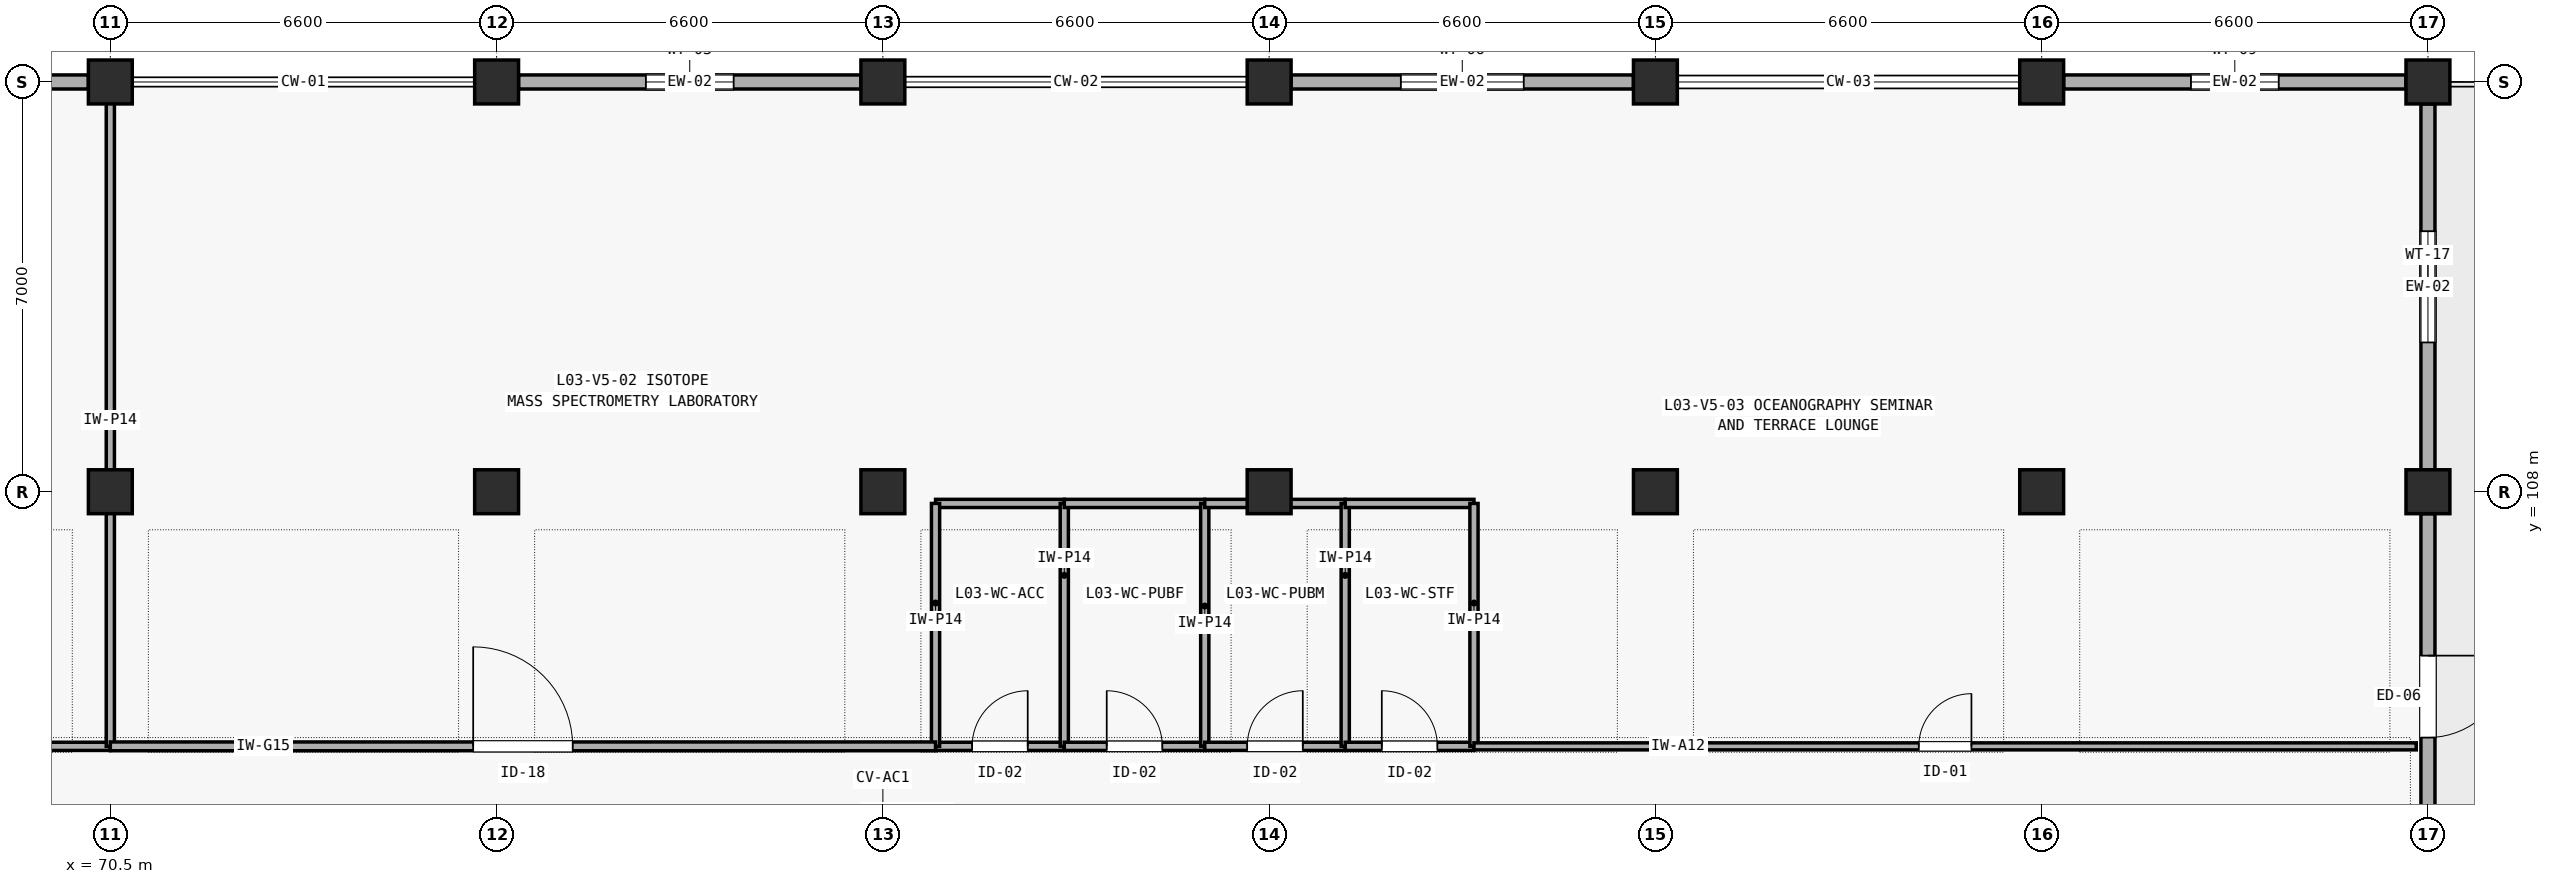
"""IFC4 building model, lengths in metres.
Left out: names, types, materials, properties, quantities, classifications, styles, units other than length and angle.
Written with IfcOpenShell. Run it as: python <this file> out.ifc"""

import sys

from ifc_helpers import new_model, si_unit, direction, frame, frame_2d, origin, origin_2d, place, context, subcontext, project, spatial, rectangle, extrude, element, fill, save


model = new_model("IFC4")
c1 = context("Model", 3, precision=1e-05, world=origin(), true_north=direction((0.0, 1.0)))
c2 = subcontext(c1, "Body", "Model", "MODEL_VIEW")
j1 = project(units=[si_unit("LENGTHUNIT", "METRE"), si_unit("PLANEANGLEUNIT", "RADIAN")], contexts=[c1])
p1 = place(None, origin())
s1 = spatial("IfcSite", under=j1, at=p1, CompositionType="ELEMENT")
p2 = place(p1, origin())
s2 = spatial("IfcBuilding", under=s1, at=p2, CompositionType="ELEMENT")
p3 = place(p2, frame((0.0, 0.0, 12.6)))
s3 = spatial("IfcBuildingStorey", under=s2, at=p3, CompositionType="ELEMENT", Elevation=12.6)
for number, where, z_axis, x_axis in (
    (1, (70.5, 108.0, 0.0), (0.0, 0.0, 1.0), (1.0, 0.0, 0.0)),
    (2, (70.5, 115.0, 0.0), (0.0, 0.0, 1.0), (1.0, 0.0, 0.0)),
    (3, (77.1, 108.0, 0.0), (0.0, 0.0, 1.0), (1.0, 0.0, 0.0)),
    (4, (77.1, 115.0, 0.0), (0.0, 0.0, 1.0), (1.0, 0.0, 0.0)),
    (5, (83.7, 108.0, 0.0), (0.0, 0.0, 1.0), (1.0, 0.0, 0.0)),
    (6, (83.7, 115.0, 0.0), (0.0, 0.0, 1.0), (1.0, 0.0, 0.0)),
    (7, (90.3, 108.0, 0.0), (0.0, 0.0, 1.0), (1.0, 0.0, 0.0)),
    (8, (90.3, 115.0, 0.0), (0.0, 0.0, 1.0), (1.0, 0.0, 0.0)),
    (9, (96.9, 108.0, 0.0), (0.0, 0.0, 1.0), (1.0, 0.0, 0.0)),
    (10, (96.9, 115.0, 0.0), (0.0, 0.0, 1.0), (1.0, 0.0, 0.0)),
    (11, (103.5, 108.0, 0.0), (0.0, 0.0, 1.0), (1.0, 0.0, 0.0)),
    (12, (103.5, 115.0, 0.0), (0.0, 0.0, 1.0), (1.0, 0.0, 0.0)),
    (13, (110.1, 108.0, 0.0), (0.0, 0.0, 1.0), (1.0, 0.0, 0.0)),
    (14, (110.1, 115.0, 0.0), (0.0, 0.0, 1.0), (1.0, 0.0, 0.0)),
):
    element("IfcColumn", number, at=place(p3, frame(where, z_axis=z_axis, x_axis=x_axis)), inside=s3, PredefinedType="COLUMN", context=c2, shape_type="SweptSolid", body=[
        extrude(rectangle(XDim=0.75, YDim=0.75, at=origin_2d()), origin(), (0.0, 0.0, 1.0), 4.2),
    ])
p4 = place(p3, frame((64.275, 115.0, 0.0), z_axis=(0.0, 0.0, 1.0), x_axis=(1.0, 0.0, 0.0)))
e15 = element("IfcWall", 15, at=p4, inside=s3, PredefinedType="SOLIDWALL", context=c2, shape_type="SweptSolid", body=[
    extrude(rectangle(XDim=5.85, YDim=0.24, at=frame_2d((2.925, 0.0))), origin(), (0.0, 0.0, 1.0), 3.285),
])
p5 = place(p4, frame((1.9, 0.0, 0.85)))
e16 = element("IfcOpeningElement", 16, at=p5, cuts=e15, PredefinedType="OPENING", context=c2, shape_type="SweptSolid", body=[
    extrude(rectangle(XDim=2.05, YDim=1.55, at=frame_2d((1.025, 0.775))), frame((0.0, 0.13, 0.0), z_axis=(0.0, -1.0, 0.0), x_axis=(1.0, 0.0, 0.0)), (0.0, 0.0, 1.0), 0.26),
])
p6 = place(p3, frame((77.475, 115.0, 0.0), z_axis=(0.0, 0.0, 1.0), x_axis=(1.0, 0.0, 0.0)))
e17 = element("IfcWall", 17, at=p6, inside=s3, PredefinedType="SOLIDWALL", context=c2, shape_type="SweptSolid", body=[
    extrude(rectangle(XDim=5.85, YDim=0.24, at=frame_2d((2.925, 0.0))), origin(), (0.0, 0.0, 1.0), 3.365),
])
p7 = place(p6, frame((2.175, 0.0, 0.85)))
e18 = element("IfcOpeningElement", 18, at=p7, cuts=e17, PredefinedType="OPENING", context=c2, shape_type="SweptSolid", body=[
    extrude(rectangle(XDim=1.5, YDim=1.35, at=frame_2d((0.75, 0.675))), frame((0.0, 0.13, 0.0), z_axis=(0.0, -1.0, 0.0), x_axis=(1.0, 0.0, 0.0)), (0.0, 0.0, 1.0), 0.26),
])
p8 = place(p3, frame((90.675, 115.0, 0.0), z_axis=(0.0, 0.0, 1.0), x_axis=(1.0, 0.0, 0.0)))
e19 = element("IfcWall", 19, at=p8, inside=s3, PredefinedType="SOLIDWALL", context=c2, shape_type="SweptSolid", body=[
    extrude(rectangle(XDim=5.85, YDim=0.24, at=frame_2d((2.925, 0.0))), origin(), (0.0, 0.0, 1.0), 3.385),
])
p9 = place(p8, frame((1.875, 0.0, 0.85)))
e20 = element("IfcOpeningElement", 20, at=p9, cuts=e19, PredefinedType="OPENING", context=c2, shape_type="SweptSolid", body=[
    extrude(rectangle(XDim=2.1, YDim=1.35, at=frame_2d((1.05, 0.675))), frame((0.0, 0.13, 0.0), z_axis=(0.0, -1.0, 0.0), x_axis=(1.0, 0.0, 0.0)), (0.0, 0.0, 1.0), 0.26),
])
p10 = place(p3, frame((103.875, 115.0, 0.0), z_axis=(0.0, 0.0, 1.0), x_axis=(1.0, 0.0, 0.0)))
e21 = element("IfcWall", 21, at=p10, inside=s3, PredefinedType="SOLIDWALL", context=c2, shape_type="SweptSolid", body=[
    extrude(rectangle(XDim=5.85, YDim=0.24, at=frame_2d((2.925, 0.0))), origin(), (0.0, 0.0, 1.0), 3.135),
])
p11 = place(p10, frame((2.175, 0.0, 0.85)))
e22 = element("IfcOpeningElement", 22, at=p11, cuts=e21, PredefinedType="OPENING", context=c2, shape_type="SweptSolid", body=[
    extrude(rectangle(XDim=1.5, YDim=1.5, at=frame_2d((0.75, 0.75))), frame((0.0, 0.13, 0.0), z_axis=(0.0, -1.0, 0.0), x_axis=(1.0, 0.0, 0.0)), (0.0, 0.0, 1.0), 0.26),
])
p12 = place(p3, frame((110.1, 101.375, 0.0), z_axis=(0.0, 0.0, 1.0), x_axis=(0.0, 1.0, 0.0)))
e23 = element("IfcWall", 23, at=p12, inside=s3, PredefinedType="SOLIDWALL", context=c2, shape_type="SweptSolid", body=[
    extrude(rectangle(XDim=6.25, YDim=0.24, at=frame_2d((3.125, 0.0))), origin(), (0.0, 0.0, 1.0), 3.565),
])
p13 = place(p12, frame((2.425, 0.0, 0.0)))
e24 = element("IfcOpeningElement", 24, at=p13, cuts=e23, PredefinedType="OPENING", context=c2, shape_type="SweptSolid", body=[
    extrude(rectangle(XDim=1.4, YDim=2.15, at=frame_2d((0.7, 1.075))), frame((0.0, 0.13, 0.0), z_axis=(0.0, -1.0, 0.0), x_axis=(1.0, 0.0, 0.0)), (0.0, 0.0, 1.0), 0.26),
])
p14 = place(p3, frame((110.1, 108.375, 0.0), z_axis=(0.0, 0.0, 1.0), x_axis=(0.0, 1.0, 0.0)))
e25 = element("IfcWall", 25, at=p14, inside=s3, PredefinedType="SOLIDWALL", context=c2, shape_type="SweptSolid", body=[
    extrude(rectangle(XDim=6.25, YDim=0.24, at=frame_2d((3.125, 0.0))), origin(), (0.0, 0.0, 1.0), 3.565),
])
p15 = place(p14, frame((2.175, 0.0, 0.85)))
e26 = element("IfcOpeningElement", 26, at=p15, cuts=e25, PredefinedType="OPENING", context=c2, shape_type="SweptSolid", body=[
    extrude(rectangle(XDim=1.9, YDim=1.25, at=frame_2d((0.95, 0.625))), frame((0.0, 0.13, 0.0), z_axis=(0.0, -1.0, 0.0), x_axis=(1.0, 0.0, 0.0)), (0.0, 0.0, 1.0), 0.26),
])
p16 = place(p3, frame((84.6, 103.65, 0.0), z_axis=(0.0, 0.0, 1.0), x_axis=(1.0, 0.0, 0.0)))
e27 = element("IfcWall", 27, at=p16, inside=s3, PredefinedType="PLUMBINGWALL", context=c2, shape_type="SweptSolid", body=[
    extrude(rectangle(XDim=2.2, YDim=0.14, at=frame_2d((1.1, 0.0))), origin(), (0.0, 0.0, 1.0), 3.9),
])
p17 = place(p16, frame((0.625, 0.0, 0.0)))
e28 = element("IfcOpeningElement", 28, at=p17, cuts=e27, PredefinedType="OPENING", context=c2, shape_type="SweptSolid", body=[
    extrude(rectangle(XDim=0.95, YDim=2.1, at=frame_2d((0.475, 1.05))), frame((0.0, 0.08, 0.0), z_axis=(0.0, -1.0, 0.0), x_axis=(1.0, 0.0, 0.0)), (0.0, 0.0, 1.0), 0.16),
])
p18 = place(p3, frame((84.6, 107.8, 0.0), z_axis=(0.0, 0.0, 1.0), x_axis=(1.0, 0.0, 0.0)))
e29 = element("IfcWall", 29, at=p18, inside=s3, PredefinedType="PLUMBINGWALL", context=c2, shape_type="SweptSolid", body=[
    extrude(rectangle(XDim=2.2, YDim=0.14, at=frame_2d((1.1, 0.0))), origin(), (0.0, 0.0, 1.0), 3.385),
])
for number, where, z_axis, x_axis in (
    (30, (84.6, 103.65, 0.0), (0.0, 0.0, 1.0), (0.0, 1.0, 0.0)),
    (31, (86.8, 103.65, 0.0), (0.0, 0.0, 1.0), (0.0, 1.0, 0.0)),
):
    element("IfcWall", number, at=place(p3, frame(where, z_axis=z_axis, x_axis=x_axis)), inside=s3, PredefinedType="PLUMBINGWALL", context=c2, shape_type="SweptSolid", body=[
        extrude(rectangle(XDim=4.15, YDim=0.14, at=frame_2d((2.075, 0.0))), origin(), (0.0, 0.0, 1.0), 3.9),
    ])
p19 = place(p3, frame((86.8, 103.65, 0.0), z_axis=(0.0, 0.0, 1.0), x_axis=(1.0, 0.0, 0.0)))
e32 = element("IfcWall", 32, at=p19, inside=s3, PredefinedType="PLUMBINGWALL", context=c2, shape_type="SweptSolid", body=[
    extrude(rectangle(XDim=2.4, YDim=0.14, at=frame_2d((1.2, 0.0))), origin(), (0.0, 0.0, 1.0), 3.9),
])
p20 = place(p19, frame((0.725, 0.0, 0.0)))
e33 = element("IfcOpeningElement", 33, at=p20, cuts=e32, PredefinedType="OPENING", context=c2, shape_type="SweptSolid", body=[
    extrude(rectangle(XDim=0.95, YDim=2.1, at=frame_2d((0.475, 1.05))), frame((0.0, 0.08, 0.0), z_axis=(0.0, -1.0, 0.0), x_axis=(1.0, 0.0, 0.0)), (0.0, 0.0, 1.0), 0.16),
])
p21 = place(p3, frame((86.8, 107.8, 0.0), z_axis=(0.0, 0.0, 1.0), x_axis=(1.0, 0.0, 0.0)))
e34 = element("IfcWall", 34, at=p21, inside=s3, PredefinedType="PLUMBINGWALL", context=c2, shape_type="SweptSolid", body=[
    extrude(rectangle(XDim=2.4, YDim=0.14, at=frame_2d((1.2, 0.0))), origin(), (0.0, 0.0, 1.0), 3.385),
])
p22 = place(p3, frame((89.2, 103.65, 0.0), z_axis=(0.0, 0.0, 1.0), x_axis=(0.0, 1.0, 0.0)))
e35 = element("IfcWall", 35, at=p22, inside=s3, PredefinedType="PLUMBINGWALL", context=c2, shape_type="SweptSolid", body=[
    extrude(rectangle(XDim=4.15, YDim=0.14, at=frame_2d((2.075, 0.0))), origin(), (0.0, 0.0, 1.0), 3.9),
])
p23 = place(p3, frame((89.2, 103.65, 0.0), z_axis=(0.0, 0.0, 1.0), x_axis=(1.0, 0.0, 0.0)))
e36 = element("IfcWall", 36, at=p23, inside=s3, PredefinedType="PLUMBINGWALL", context=c2, shape_type="SweptSolid", body=[
    extrude(rectangle(XDim=2.4, YDim=0.14, at=frame_2d((1.2, 0.0))), origin(), (0.0, 0.0, 1.0), 3.9),
])
p24 = place(p23, frame((0.725, 0.0, 0.0)))
e37 = element("IfcOpeningElement", 37, at=p24, cuts=e36, PredefinedType="OPENING", context=c2, shape_type="SweptSolid", body=[
    extrude(rectangle(XDim=0.95, YDim=2.1, at=frame_2d((0.475, 1.05))), frame((0.0, 0.08, 0.0), z_axis=(0.0, -1.0, 0.0), x_axis=(1.0, 0.0, 0.0)), (0.0, 0.0, 1.0), 0.16),
])
p25 = place(p3, frame((89.2, 107.8, 0.0), z_axis=(0.0, 0.0, 1.0), x_axis=(1.0, 0.0, 0.0)))
e38 = element("IfcWall", 38, at=p25, inside=s3, PredefinedType="PLUMBINGWALL", context=c2, shape_type="SweptSolid", body=[
    extrude(rectangle(XDim=2.4, YDim=0.14, at=frame_2d((1.2, 0.0))), origin(), (0.0, 0.0, 1.0), 3.385),
])
p26 = place(p3, frame((91.6, 103.65, 0.0), z_axis=(0.0, 0.0, 1.0), x_axis=(0.0, 1.0, 0.0)))
e39 = element("IfcWall", 39, at=p26, inside=s3, PredefinedType="PLUMBINGWALL", context=c2, shape_type="SweptSolid", body=[
    extrude(rectangle(XDim=4.15, YDim=0.14, at=frame_2d((2.075, 0.0))), origin(), (0.0, 0.0, 1.0), 3.9),
])
p27 = place(p3, frame((91.6, 103.65, 0.0), z_axis=(0.0, 0.0, 1.0), x_axis=(1.0, 0.0, 0.0)))
e40 = element("IfcWall", 40, at=p27, inside=s3, PredefinedType="PLUMBINGWALL", context=c2, shape_type="SweptSolid", body=[
    extrude(rectangle(XDim=2.2, YDim=0.14, at=frame_2d((1.1, 0.0))), origin(), (0.0, 0.0, 1.0), 3.9),
])
p28 = place(p27, frame((0.625, 0.0, 0.0)))
e41 = element("IfcOpeningElement", 41, at=p28, cuts=e40, PredefinedType="OPENING", context=c2, shape_type="SweptSolid", body=[
    extrude(rectangle(XDim=0.95, YDim=2.1, at=frame_2d((0.475, 1.05))), frame((0.0, 0.08, 0.0), z_axis=(0.0, -1.0, 0.0), x_axis=(1.0, 0.0, 0.0)), (0.0, 0.0, 1.0), 0.16),
])
p29 = place(p3, frame((91.6, 107.8, 0.0), z_axis=(0.0, 0.0, 1.0), x_axis=(1.0, 0.0, 0.0)))
e42 = element("IfcWall", 42, at=p29, inside=s3, PredefinedType="PLUMBINGWALL", context=c2, shape_type="SweptSolid", body=[
    extrude(rectangle(XDim=2.2, YDim=0.14, at=frame_2d((1.1, 0.0))), origin(), (0.0, 0.0, 1.0), 3.385),
])
p30 = place(p3, frame((93.8, 103.65, 0.0), z_axis=(0.0, 0.0, 1.0), x_axis=(0.0, 1.0, 0.0)))
e43 = element("IfcWall", 43, at=p30, inside=s3, PredefinedType="PLUMBINGWALL", context=c2, shape_type="SweptSolid", body=[
    extrude(rectangle(XDim=4.15, YDim=0.14, at=frame_2d((2.075, 0.0))), origin(), (0.0, 0.0, 1.0), 3.9),
])
p31 = place(p3, frame((57.5, 103.65, 0.0), z_axis=(0.0, 0.0, 1.0), x_axis=(1.0, 0.0, 0.0)))
e44 = element("IfcWall", 44, at=p31, inside=s3, PredefinedType="PLUMBINGWALL", context=c2, shape_type="SweptSolid", body=[
    extrude(rectangle(XDim=13.0, YDim=0.14, at=frame_2d((6.5, 0.0))), origin(), (0.0, 0.0, 1.0), 3.9),
])
p32 = place(p31, frame((5.75, 0.0, 0.0)))
e45 = element("IfcOpeningElement", 45, at=p32, cuts=e44, PredefinedType="OPENING", context=c2, shape_type="SweptSolid", body=[
    extrude(rectangle(XDim=1.5, YDim=2.15, at=frame_2d((0.75, 1.075))), frame((0.0, 0.08, 0.0), z_axis=(0.0, -1.0, 0.0), x_axis=(1.0, 0.0, 0.0)), (0.0, 0.0, 1.0), 0.16),
])
p33 = place(p3, frame((70.5, 103.65, 0.0), z_axis=(0.0, 0.0, 1.0), x_axis=(0.0, 1.0, 0.0)))
e46 = element("IfcWall", 46, at=p33, inside=s3, PredefinedType="PLUMBINGWALL", context=c2, shape_type="SweptSolid", body=[
    extrude(rectangle(XDim=11.15, YDim=0.14, at=frame_2d((5.575, 0.0))), origin(), (0.0, 0.0, 1.0), 3.545),
])
p34 = place(p3, frame((70.5, 103.65, 0.0), z_axis=(0.0, 0.0, 1.0), x_axis=(1.0, 0.0, 0.0)))
e47 = element("IfcWall", 47, at=p34, inside=s3, PredefinedType="PARTITIONING", context=c2, shape_type="SweptSolid", body=[
    extrude(rectangle(XDim=14.1, YDim=0.15, at=frame_2d((7.05, 0.0))), origin(), (0.0, 0.0, 1.0), 3.9),
])
p35 = place(p34, frame((6.2, 0.0, 0.0)))
e48 = element("IfcOpeningElement", 48, at=p35, cuts=e47, PredefinedType="OPENING", context=c2, shape_type="SweptSolid", body=[
    extrude(rectangle(XDim=1.7, YDim=2.2, at=frame_2d((0.85, 1.1))), frame((0.0, 0.085, 0.0), z_axis=(0.0, -1.0, 0.0), x_axis=(1.0, 0.0, 0.0)), (0.0, 0.0, 1.0), 0.17),
])
p36 = place(p3, frame((93.8, 103.65, 0.0), z_axis=(0.0, 0.0, 1.0), x_axis=(1.0, 0.0, 0.0)))
e49 = element("IfcWall", 49, at=p36, inside=s3, PredefinedType="PARTITIONING", context=c2, shape_type="SweptSolid", body=[
    extrude(rectangle(XDim=16.1, YDim=0.12, at=frame_2d((8.05, 0.0))), origin(), (0.0, 0.0, 1.0), 3.9),
])
p37 = place(p36, frame((7.6, 0.0, 0.0)))
e50 = element("IfcOpeningElement", 50, at=p37, cuts=e49, PredefinedType="OPENING", context=c2, shape_type="SweptSolid", body=[
    extrude(rectangle(XDim=0.9, YDim=2.1, at=frame_2d((0.45, 1.05))), frame((0.0, 0.07, 0.0), z_axis=(0.0, -1.0, 0.0), x_axis=(1.0, 0.0, 0.0)), (0.0, 0.0, 1.0), 0.14),
])
p38 = place(p7, origin())
e51 = element("IfcWindow", 51, at=p38, inside=s3, PartitioningType="SINGLE_PANEL", PredefinedType="WINDOW", context=c2, shape_type="SweptSolid", body=[
    extrude(rectangle(XDim=1.5, YDim=1.35, at=frame_2d((0.75, 0.675))), frame((0.0, 0.03, 0.0), z_axis=(0.0, -1.0, 0.0), x_axis=(1.0, 0.0, 0.0)), (0.0, 0.0, 1.0), 0.06),
])
fill(e18, e51)
p39 = place(p9, origin())
e52 = element("IfcWindow", 52, at=p39, inside=s3, PartitioningType="SINGLE_PANEL", PredefinedType="WINDOW", context=c2, shape_type="SweptSolid", body=[
    extrude(rectangle(XDim=2.1, YDim=1.35, at=frame_2d((1.05, 0.675))), frame((0.0, 0.03, 0.0), z_axis=(0.0, -1.0, 0.0), x_axis=(1.0, 0.0, 0.0)), (0.0, 0.0, 1.0), 0.06),
])
fill(e20, e52)
p40 = place(p11, origin())
e53 = element("IfcWindow", 53, at=p40, inside=s3, PartitioningType="SINGLE_PANEL", PredefinedType="WINDOW", context=c2, shape_type="SweptSolid", body=[
    extrude(rectangle(XDim=1.5, YDim=1.5, at=frame_2d((0.75, 0.75))), frame((0.0, 0.03, 0.0), z_axis=(0.0, -1.0, 0.0), x_axis=(1.0, 0.0, 0.0)), (0.0, 0.0, 1.0), 0.06),
])
fill(e22, e53)
p41 = place(p13, frame((1.4, 0.0, 0.0), z_axis=(0.0, 0.0, 1.0), x_axis=(-1.0, 0.0, 0.0)))
e54 = element("IfcDoor", 54, at=p41, inside=s3, OperationType="SINGLE_SWING_LEFT", PredefinedType="DOOR", context=c2, shape_type="SweptSolid", body=[
    extrude(rectangle(XDim=1.4, YDim=2.15, at=frame_2d((0.7, 1.075))), frame((0.0, 0.025, 0.0), z_axis=(0.0, -1.0, 0.0), x_axis=(1.0, 0.0, 0.0)), (0.0, 0.0, 1.0), 0.05),
])
fill(e24, e54)
p42 = place(p15, origin())
e55 = element("IfcWindow", 55, at=p42, inside=s3, PartitioningType="SINGLE_PANEL", PredefinedType="WINDOW", context=c2, shape_type="SweptSolid", body=[
    extrude(rectangle(XDim=1.9, YDim=1.25, at=frame_2d((0.95, 0.625))), frame((0.0, 0.03, 0.0), z_axis=(0.0, -1.0, 0.0), x_axis=(1.0, 0.0, 0.0)), (0.0, 0.0, 1.0), 0.06),
])
fill(e26, e55)
p43 = place(p17, origin())
e56 = element("IfcDoor", 56, at=p43, inside=s3, OperationType="SINGLE_SWING_RIGHT", PredefinedType="DOOR", context=c2, shape_type="SweptSolid", body=[
    extrude(rectangle(XDim=0.95, YDim=2.1, at=frame_2d((0.475, 1.05))), frame((0.0, 0.025, 0.0), z_axis=(0.0, -1.0, 0.0), x_axis=(1.0, 0.0, 0.0)), (0.0, 0.0, 1.0), 0.05),
])
fill(e28, e56)
p44 = place(p20, origin())
e57 = element("IfcDoor", 57, at=p44, inside=s3, OperationType="SINGLE_SWING_LEFT", PredefinedType="DOOR", context=c2, shape_type="SweptSolid", body=[
    extrude(rectangle(XDim=0.95, YDim=2.1, at=frame_2d((0.475, 1.05))), frame((0.0, 0.025, 0.0), z_axis=(0.0, -1.0, 0.0), x_axis=(1.0, 0.0, 0.0)), (0.0, 0.0, 1.0), 0.05),
])
fill(e33, e57)
p45 = place(p24, origin())
e58 = element("IfcDoor", 58, at=p45, inside=s3, OperationType="SINGLE_SWING_RIGHT", PredefinedType="DOOR", context=c2, shape_type="SweptSolid", body=[
    extrude(rectangle(XDim=0.95, YDim=2.1, at=frame_2d((0.475, 1.05))), frame((0.0, 0.025, 0.0), z_axis=(0.0, -1.0, 0.0), x_axis=(1.0, 0.0, 0.0)), (0.0, 0.0, 1.0), 0.05),
])
fill(e37, e58)
p46 = place(p28, origin())
e59 = element("IfcDoor", 59, at=p46, inside=s3, OperationType="SINGLE_SWING_LEFT", PredefinedType="DOOR", context=c2, shape_type="SweptSolid", body=[
    extrude(rectangle(XDim=0.95, YDim=2.1, at=frame_2d((0.475, 1.05))), frame((0.0, 0.025, 0.0), z_axis=(0.0, -1.0, 0.0), x_axis=(1.0, 0.0, 0.0)), (0.0, 0.0, 1.0), 0.05),
])
fill(e41, e59)
p47 = place(p35, origin())
e60 = element("IfcDoor", 60, at=p47, inside=s3, OperationType="SINGLE_SWING_LEFT", PredefinedType="DOOR", context=c2, shape_type="SweptSolid", body=[
    extrude(rectangle(XDim=1.7, YDim=2.2, at=frame_2d((0.85, 1.1))), frame((0.0, 0.025, 0.0), z_axis=(0.0, -1.0, 0.0), x_axis=(1.0, 0.0, 0.0)), (0.0, 0.0, 1.0), 0.05),
])
fill(e48, e60)
p48 = place(p37, origin())
e61 = element("IfcDoor", 61, at=p48, inside=s3, OperationType="SINGLE_SWING_RIGHT", PredefinedType="DOOR", context=c2, shape_type="SweptSolid", body=[
    extrude(rectangle(XDim=0.9, YDim=2.1, at=frame_2d((0.45, 1.05))), frame((0.0, 0.025, 0.0), z_axis=(0.0, -1.0, 0.0), x_axis=(1.0, 0.0, 0.0)), (0.0, 0.0, 1.0), 0.05),
])
fill(e50, e61)
save(model, sys.argv[1])
